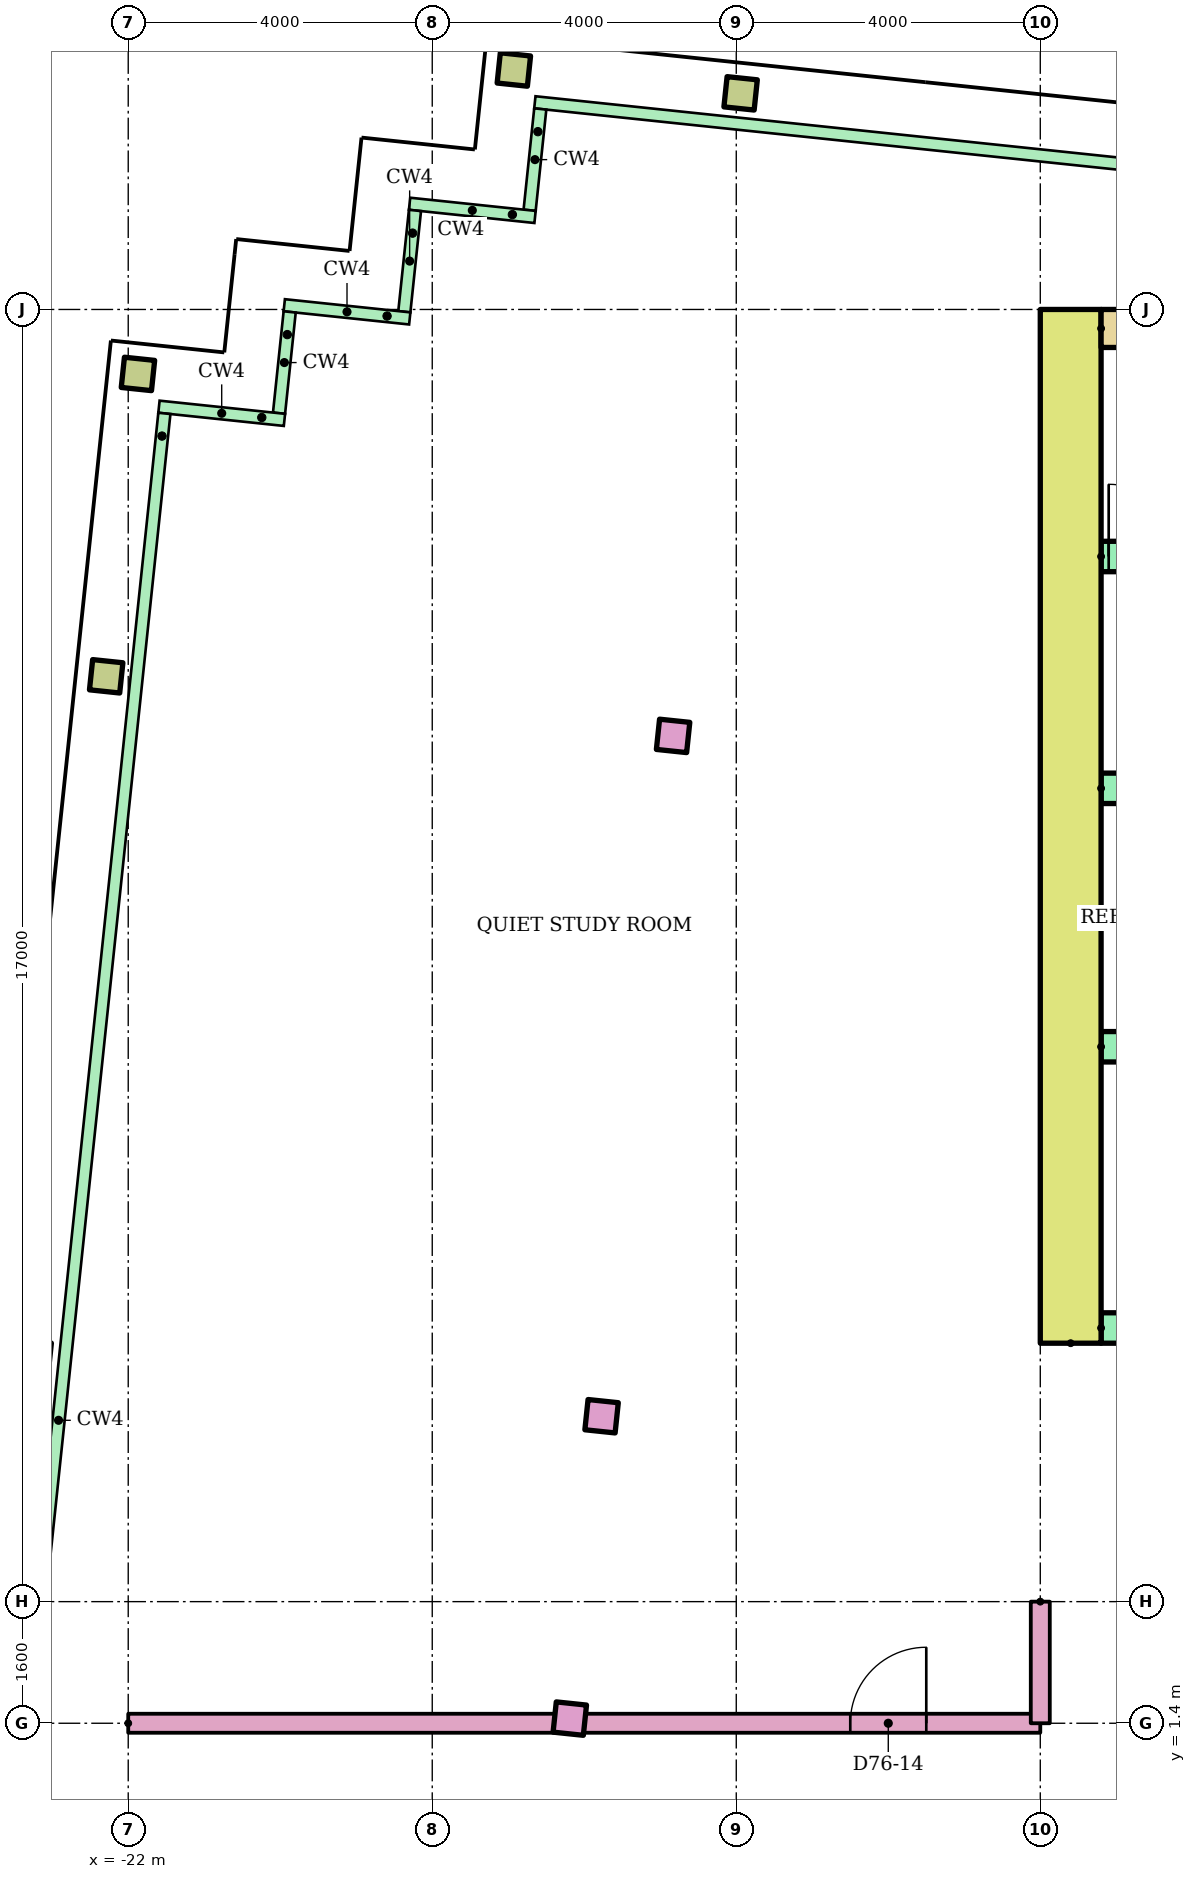
"""IFC4 building model, lengths in metres.
Left out: names, types, materials, properties, quantities, classifications, styles, units other than length and angle.
Written with IfcOpenShell. Run it as: python <this file> out.ifc"""

import sys

from ifc_helpers import new_model, si_unit, direction, frame, frame_2d, origin, origin_2d, place, context, subcontext, project, spatial, rectangle, hollow_rectangle, extrude, element, fill, save


model = new_model("IFC4")
c1 = context("Model", 3, precision=1e-05, world=origin(), true_north=direction((0.0, 1.0)))
c2 = subcontext(c1, "Body", "Model", "MODEL_VIEW")
j1 = project(units=[si_unit("LENGTHUNIT", "METRE"), si_unit("PLANEANGLEUNIT", "RADIAN")], contexts=[c1])
p1 = place(None, origin())
s1 = spatial("IfcSite", under=j1, at=p1, CompositionType="ELEMENT")
p2 = place(p1, origin())
s2 = spatial("IfcBuilding", under=s1, at=p2, CompositionType="ELEMENT")
p3 = place(p2, frame((0.0, 0.0, 294.9)))
s3 = spatial("IfcBuildingStorey", under=s2, at=p3, CompositionType="ELEMENT", Elevation=294.9)
for number, where, z_axis, x_axis in (
    (1, (-16.19, 1.461, 0.0), (0.0, 0.0, 1.0), (0.995, -0.105, 0.0)),
    (2, (-15.772, 5.439, 0.0), (0.0, 0.0, 1.0), (0.995, -0.105, 0.0)),
):
    element("IfcColumn", number, at=place(p3, frame(where, z_axis=z_axis, x_axis=x_axis)), inside=s3, PredefinedType="COLUMN", context=c2, shape_type="SweptSolid", body=[
        extrude(rectangle(XDim=0.4, YDim=0.4, at=origin_2d()), origin(), (0.0, 0.0, 1.0), 3.4),
    ])
p4 = place(p3, frame((-22.29, 15.174, 0.0), z_axis=(0.0, 0.0, 1.0), x_axis=(0.994521895368, -0.104528463268, 0.0)))
e3 = element("IfcColumn", 3, at=p4, inside=s3, PredefinedType="COLUMN", context=c2, shape_type="SweptSolid", body=[
    extrude(hollow_rectangle(XDim=0.4, YDim=0.4, WallThickness=0.02, at=origin_2d()), origin(), (0.0, 0.0, 1.0), 3.4),
])
p5 = place(p3, frame((-14.831, 14.39, 0.0), z_axis=(0.0, 0.0, 1.0), x_axis=(0.994521895368, -0.104528463268, 0.0)))
e4 = element("IfcColumn", 4, at=p5, inside=s3, PredefinedType="COLUMN", context=c2, shape_type="SweptSolid", body=[
    extrude(rectangle(XDim=0.4, YDim=0.4, at=origin_2d()), origin(), (0.0, 0.0, 1.0), 3.4),
])
for number, where, z_axis, x_axis in (
    (5, (-21.872, 19.152, 0.0), (0.0, 0.0, 1.0), (0.995, -0.105, 0.0)),
    (6, (-16.926, 23.157, 0.0), (0.0, 0.0, 1.0), (0.995, -0.105, 0.0)),
    (7, (-13.943, 22.843, 0.0), (0.0, 0.0, 1.0), (0.995, -0.105, 0.0)),
):
    element("IfcColumn", number, at=place(p3, frame(where, z_axis=z_axis, x_axis=x_axis)), inside=s3, PredefinedType="COLUMN", context=c2, shape_type="SweptSolid", body=[
        extrude(hollow_rectangle(XDim=0.4, YDim=0.4, WallThickness=0.02, at=origin_2d()), origin(), (0.0, 0.0, 1.0), 3.4),
    ])
p6 = place(p3, frame((-9.6, 6.4, 0.0), z_axis=(0.0, 0.0, 1.0), x_axis=(0.0, 1.0, 0.0)))
e8 = element("IfcWall", 8, at=p6, inside=s3, PredefinedType="SHEAR", context=c2, shape_type="SweptSolid", body=[
    extrude(rectangle(XDim=13.6, YDim=0.8, at=frame_2d((6.8, 0.0))), origin(), (0.0, 0.0, 1.0), 3.12),
])
p7 = place(p3, frame((-9.2, 19.75, 0.0)))
e9 = element("IfcWall", 9, at=p7, inside=s3, PredefinedType="SHEAR", context=c2, shape_type="SweptSolid", body=[
    extrude(rectangle(XDim=18.4, YDim=0.5, at=frame_2d((9.2, 0.0))), origin(), (0.0, 0.0, 1.0), 3.12),
])
p8 = place(p3, frame((-9.2, 6.6, 0.0)))
e10 = element("IfcWall", 10, at=p8, inside=s3, PredefinedType="SHEAR", context=c2, shape_type="SweptSolid", body=[
    extrude(rectangle(XDim=18.4, YDim=0.4, at=frame_2d((9.2, 0.0))), origin(), (0.0, 0.0, 1.0), 3.12),
])
p9 = place(p8, frame((8.3, 0.0, 0.0)))
e11 = element("IfcOpeningElement", 11, at=p9, cuts=e10, PredefinedType="OPENING", context=c2, shape_type="SweptSolid", body=[
    extrude(rectangle(XDim=1.8, YDim=2.1, at=frame_2d((0.9, 1.05))), frame((0.0, 0.21, 0.0), z_axis=(0.0, -1.0, 0.0), x_axis=(1.0, 0.0, 0.0)), (0.0, 0.0, 1.0), 0.42),
])
p10 = place(p8, frame((3.8, 0.0, 0.0)))
e12 = element("IfcOpeningElement", 12, at=p10, cuts=e10, PredefinedType="OPENING", context=c2, shape_type="SweptSolid", body=[
    extrude(rectangle(XDim=1.8, YDim=2.1, at=frame_2d((0.9, 1.05))), frame((0.0, 0.21, 0.0), z_axis=(0.0, -1.0, 0.0), x_axis=(1.0, 0.0, 0.0)), (0.0, 0.0, 1.0), 0.42),
])
p11 = place(p8, frame((12.8, 0.0, 0.0)))
e13 = element("IfcOpeningElement", 13, at=p11, cuts=e10, PredefinedType="OPENING", context=c2, shape_type="SweptSolid", body=[
    extrude(rectangle(XDim=1.8, YDim=2.1, at=frame_2d((0.9, 1.05))), frame((0.0, 0.21, 0.0), z_axis=(0.0, -1.0, 0.0), x_axis=(1.0, 0.0, 0.0)), (0.0, 0.0, 1.0), 0.42),
])
p12 = place(p3, frame((-9.2, 10.3, 0.0)))
e14 = element("IfcWall", 14, at=p12, inside=s3, PredefinedType="SHEAR", context=c2, shape_type="SweptSolid", body=[
    extrude(rectangle(XDim=8.0, YDim=0.4, at=frame_2d((4.0, 0.0))), origin(), (0.0, 0.0, 1.0), 3.12),
])
p13 = place(p12, frame((3.35, 0.0, 0.0)))
e15 = element("IfcOpeningElement", 15, at=p13, cuts=e14, PredefinedType="OPENING", context=c2, shape_type="SweptSolid", body=[
    extrude(rectangle(XDim=1.1, YDim=2.1, at=frame_2d((0.55, 1.05))), frame((0.0, 0.21, 0.0), z_axis=(0.0, -1.0, 0.0), x_axis=(1.0, 0.0, 0.0)), (0.0, 0.0, 1.0), 0.42),
])
p14 = place(p12, frame((6.083, 0.0, 0.0)))
e16 = element("IfcOpeningElement", 16, at=p14, cuts=e14, PredefinedType="OPENING", context=c2, shape_type="SweptSolid", body=[
    extrude(rectangle(XDim=1.1, YDim=2.1, at=frame_2d((0.55, 1.05))), frame((0.0, 0.21, 0.0), z_axis=(0.0, -1.0, 0.0), x_axis=(1.0, 0.0, 0.0)), (0.0, 0.0, 1.0), 0.42),
])
p15 = place(p12, frame((0.917, 0.0, 0.0)))
e17 = element("IfcOpeningElement", 17, at=p15, cuts=e14, PredefinedType="OPENING", context=c2, shape_type="SweptSolid", body=[
    extrude(rectangle(XDim=1.0, YDim=2.1, at=frame_2d((0.5, 1.05))), frame((0.0, 0.21, 0.0), z_axis=(0.0, -1.0, 0.0), x_axis=(1.0, 0.0, 0.0)), (0.0, 0.0, 1.0), 0.42),
])
p16 = place(p3, frame((-9.2, 13.7, 0.0)))
e18 = element("IfcWall", 18, at=p16, inside=s3, PredefinedType="SHEAR", context=c2, shape_type="SweptSolid", body=[
    extrude(rectangle(XDim=8.0, YDim=0.4, at=frame_2d((4.0, 0.0))), origin(), (0.0, 0.0, 1.0), 3.12),
])
p17 = place(p3, frame((-9.2, 16.75, 0.0)))
e19 = element("IfcWall", 19, at=p17, inside=s3, PredefinedType="SHEAR", context=c2, shape_type="SweptSolid", body=[
    extrude(rectangle(XDim=18.4, YDim=0.4, at=frame_2d((9.2, 0.0))), origin(), (0.0, 0.0, 1.0), 3.12),
])
p18 = place(p17, frame((0.1, 0.0, 0.0)))
e20 = element("IfcOpeningElement", 20, at=p18, cuts=e19, PredefinedType="OPENING", context=c2, shape_type="SweptSolid", body=[
    extrude(rectangle(XDim=0.95, YDim=2.1, at=frame_2d((0.475, 1.05))), frame((0.0, 0.21, 0.0), z_axis=(0.0, -1.0, 0.0), x_axis=(1.0, 0.0, 0.0)), (0.0, 0.0, 1.0), 0.42),
])
p19 = place(p17, frame((6.1, 0.0, 0.0)))
e21 = element("IfcOpeningElement", 21, at=p19, cuts=e19, PredefinedType="OPENING", context=c2, shape_type="SweptSolid", body=[
    extrude(rectangle(XDim=0.95, YDim=2.1, at=frame_2d((0.475, 1.05))), frame((0.0, 0.21, 0.0), z_axis=(0.0, -1.0, 0.0), x_axis=(1.0, 0.0, 0.0)), (0.0, 0.0, 1.0), 0.42),
])
p20 = place(p17, frame((12.1, 0.0, 0.0)))
e22 = element("IfcOpeningElement", 22, at=p20, cuts=e19, PredefinedType="OPENING", context=c2, shape_type="SweptSolid", body=[
    extrude(rectangle(XDim=0.95, YDim=2.1, at=frame_2d((0.475, 1.05))), frame((0.0, 0.21, 0.0), z_axis=(0.0, -1.0, 0.0), x_axis=(1.0, 0.0, 0.0)), (0.0, 0.0, 1.0), 0.42),
])
p21 = place(p3, frame((-22.0, 1.4, 0.0)))
e23 = element("IfcWall", 23, at=p21, inside=s3, PredefinedType="PARTITIONING", context=c2, shape_type="SweptSolid", body=[
    extrude(rectangle(XDim=12.0, YDim=0.25, at=frame_2d((6.0, 0.0))), origin(), (0.0, 0.0, 1.0), 2.6),
])
p22 = place(p21, frame((9.5, 0.0, 0.0)))
e24 = element("IfcOpeningElement", 24, at=p22, cuts=e23, PredefinedType="OPENING", context=c2, shape_type="SweptSolid", body=[
    extrude(rectangle(XDim=1.0, YDim=2.1, at=frame_2d((0.5, 1.05))), frame((0.0, 0.135, 0.0), z_axis=(0.0, -1.0, 0.0), x_axis=(1.0, 0.0, 0.0)), (0.0, 0.0, 1.0), 0.27),
])
p23 = place(p3, frame((-10.0, 3.0, 0.0), z_axis=(0.0, 0.0, 1.0), x_axis=(0.0, -1.0, 0.0)))
e25 = element("IfcWall", 25, at=p23, inside=s3, PredefinedType="PARTITIONING", context=c2, shape_type="SweptSolid", body=[
    extrude(rectangle(XDim=1.6, YDim=0.25, at=frame_2d((0.8, 0.0))), origin(), (0.0, 0.0, 1.0), 2.6),
])
p24 = place(p18, origin())
e26 = element("IfcDoor", 26, at=p24, inside=s3, OperationType="SINGLE_SWING_LEFT", PredefinedType="DOOR", context=c2, shape_type="SweptSolid", body=[
    extrude(rectangle(XDim=0.95, YDim=2.1, at=frame_2d((0.475, 1.05))), frame((0.0, 0.025, 0.0), z_axis=(0.0, -1.0, 0.0), x_axis=(1.0, 0.0, 0.0)), (0.0, 0.0, 1.0), 0.05),
])
fill(e20, e26)
p25 = place(p22, origin())
e27 = element("IfcDoor", 27, at=p25, inside=s3, OperationType="SINGLE_SWING_RIGHT", PredefinedType="DOOR", context=c2, shape_type="SweptSolid", body=[
    extrude(rectangle(XDim=1.0, YDim=2.1, at=frame_2d((0.5, 1.05))), frame((0.0, 0.025, 0.0), z_axis=(0.0, -1.0, 0.0), x_axis=(1.0, 0.0, 0.0)), (0.0, 0.0, 1.0), 0.05),
])
fill(e24, e27)
save(model, sys.argv[1])
